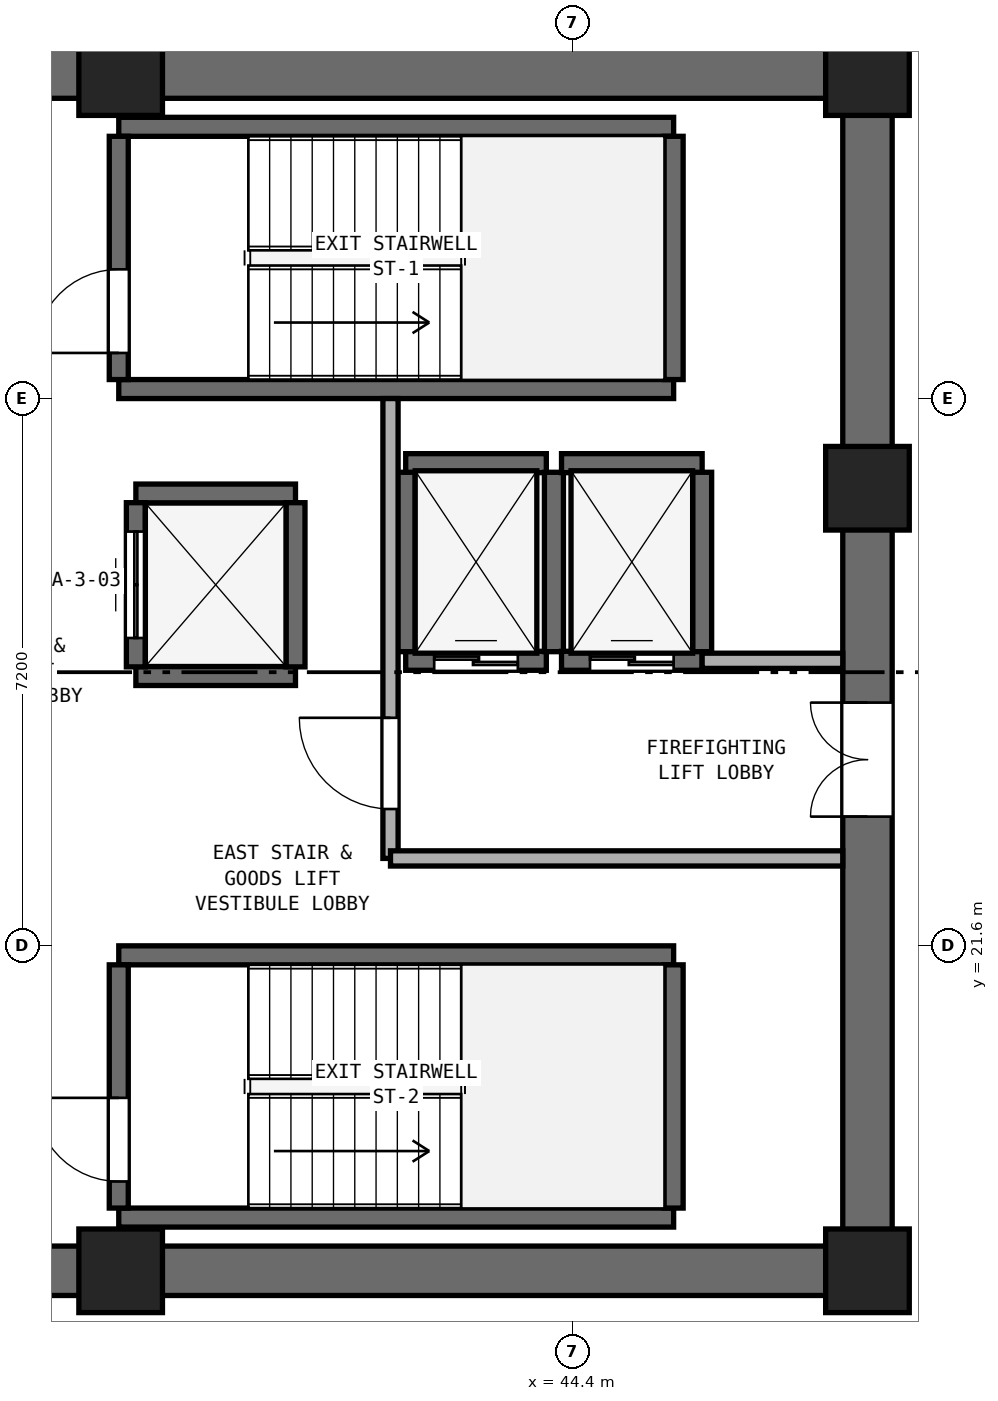
"""IFC4 building model, lengths in metres.
Left out: names, types, materials, properties, quantities, classifications, styles, units other than length and angle.
Written with IfcOpenShell. Run it as: python <this file> out.ifc"""

import sys

from ifc_helpers import new_model, si_unit, direction, frame, frame_2d, origin, origin_2d, place, context, subcontext, project, spatial, rectangle, extrude, element, fill, save


model = new_model("IFC4")
c1 = context("Model", 3, precision=1e-05, world=origin(), true_north=direction((0.0, 1.0)))
c2 = subcontext(c1, "Body", "Model", "MODEL_VIEW")
j1 = project(units=[si_unit("LENGTHUNIT", "METRE"), si_unit("PLANEANGLEUNIT", "RADIAN")], contexts=[c1])
p1 = place(None, origin())
s1 = spatial("IfcSite", under=j1, at=p1, CompositionType="ELEMENT")
p2 = place(p1, origin())
s2 = spatial("IfcBuilding", under=s1, at=p2, CompositionType="ELEMENT")
p3 = place(p2, frame((0.0, 0.0, 78.2)))
s3 = spatial("IfcBuildingStorey", under=s2, at=p3, CompositionType="ELEMENT", Elevation=78.2)
for number, where, z_axis, x_axis in (
    (1, (25.4, 17.325, 0.0), (0.0, 0.0, 1.0), (1.0, 0.0, 0.0)),
    (2, (25.4, 33.075, 0.0), (0.0, 0.0, 1.0), (1.0, 0.0, 0.0)),
):
    element("IfcWall", number, at=place(p3, frame(where, z_axis=z_axis, x_axis=x_axis)), inside=s3, PredefinedType="SHEAR", context=c2, shape_type="SweptSolid", body=[
        extrude(rectangle(XDim=23.2, YDim=0.65, at=frame_2d((11.6, 0.0))), origin(), (0.0, 0.0, 1.0), 3.525),
    ])
p4 = place(p3, frame((48.275, 17.65, 0.0), z_axis=(0.0, 0.0, 1.0), x_axis=(0.0, 1.0, 0.0)))
e3 = element("IfcWall", 3, at=p4, inside=s3, PredefinedType="SHEAR", context=c2, shape_type="SweptSolid", body=[
    extrude(rectangle(XDim=15.1, YDim=0.65, at=frame_2d((7.55, 0.0))), origin(), (0.0, 0.0, 1.0), 3.525),
])
p5 = place(p4, frame((5.65, 0.0, 0.0)))
e4 = element("IfcOpeningElement", 4, at=p5, cuts=e3, PredefinedType="OPENING", context=c2, shape_type="SweptSolid", body=[
    extrude(rectangle(XDim=1.5, YDim=2.15, at=frame_2d((0.75, 1.075))), frame((0.0, 0.335, 0.0), z_axis=(0.0, -1.0, 0.0), x_axis=(1.0, 0.0, 0.0)), (0.0, 0.0, 1.0), 0.67),
])
for number, where, z_axis, x_axis in (
    (5, (38.45, 17.325, 0.0), (0.0, 0.0, 1.0), (1.0, 0.0, 0.0)),
    (6, (48.275, 17.325, 0.0), (0.0, 0.0, 1.0), (1.0, 0.0, 0.0)),
    (7, (48.275, 27.62, 0.0), (0.0, 0.0, 1.0), (1.0, 0.0, 0.0)),
    (8, (48.275, 33.075, 0.0), (0.0, 0.0, 1.0), (1.0, 0.0, 0.0)),
    (9, (38.45, 33.075, 0.0), (0.0, 0.0, 1.0), (1.0, 0.0, 0.0)),
):
    element("IfcColumn", number, at=place(p3, frame(where, z_axis=z_axis, x_axis=x_axis)), inside=s3, PredefinedType="PILASTER", context=c2, shape_type="SweptSolid", body=[
        extrude(rectangle(XDim=1.1, YDim=1.1, at=origin_2d()), origin(), (0.0, 0.0, 1.0), 3.8),
    ])
for number, where, z_axis, x_axis in (
    (10, (38.425, 28.925, 0.0), (0.0, 0.0, 1.0), (1.0, 0.0, 0.0)),
    (11, (38.425, 32.375, 0.0), (0.0, 0.0, 1.0), (1.0, 0.0, 0.0)),
):
    element("IfcWall", number, at=place(p3, frame(where, z_axis=z_axis, x_axis=x_axis)), inside=s3, PredefinedType="SHEAR", context=c2, shape_type="SweptSolid", body=[
        extrude(rectangle(XDim=7.3, YDim=0.25, at=frame_2d((3.65, 0.0))), origin(), (0.0, 0.0, 1.0), 3.525),
    ])
p6 = place(p3, frame((38.425, 29.05, 0.0), z_axis=(0.0, 0.0, 1.0), x_axis=(0.0, 1.0, 0.0)))
e12 = element("IfcWall", 12, at=p6, inside=s3, PredefinedType="SHEAR", context=c2, shape_type="SweptSolid", body=[
    extrude(rectangle(XDim=3.2, YDim=0.25, at=frame_2d((1.6, 0.0))), origin(), (0.0, 0.0, 1.0), 3.525),
])
p7 = place(p6, frame((0.35, 0.0, 0.0)))
e13 = element("IfcOpeningElement", 13, at=p7, cuts=e12, PredefinedType="OPENING", context=c2, shape_type="SweptSolid", body=[
    extrude(rectangle(XDim=1.1, YDim=2.15, at=frame_2d((0.55, 1.075))), frame((0.0, 0.135, 0.0), z_axis=(0.0, -1.0, 0.0), x_axis=(1.0, 0.0, 0.0)), (0.0, 0.0, 1.0), 0.27),
])
p8 = place(p3, frame((45.725, 29.05, 0.0), z_axis=(0.0, 0.0, 1.0), x_axis=(0.0, 1.0, 0.0)))
e14 = element("IfcWall", 14, at=p8, inside=s3, PredefinedType="SHEAR", context=c2, shape_type="SweptSolid", body=[
    extrude(rectangle(XDim=3.2, YDim=0.25, at=frame_2d((1.6, 0.0))), origin(), (0.0, 0.0, 1.0), 3.525),
])
for number, where, z_axis, x_axis in (
    (15, (38.425, 18.025, 0.0), (0.0, 0.0, 1.0), (1.0, 0.0, 0.0)),
    (16, (38.425, 21.475, 0.0), (0.0, 0.0, 1.0), (1.0, 0.0, 0.0)),
):
    element("IfcWall", number, at=place(p3, frame(where, z_axis=z_axis, x_axis=x_axis)), inside=s3, PredefinedType="SHEAR", context=c2, shape_type="SweptSolid", body=[
        extrude(rectangle(XDim=7.3, YDim=0.25, at=frame_2d((3.65, 0.0))), origin(), (0.0, 0.0, 1.0), 3.525),
    ])
p9 = place(p3, frame((38.425, 18.15, 0.0), z_axis=(0.0, 0.0, 1.0), x_axis=(0.0, 1.0, 0.0)))
e17 = element("IfcWall", 17, at=p9, inside=s3, PredefinedType="SHEAR", context=c2, shape_type="SweptSolid", body=[
    extrude(rectangle(XDim=3.2, YDim=0.25, at=frame_2d((1.6, 0.0))), origin(), (0.0, 0.0, 1.0), 3.525),
])
p10 = place(p9, frame((0.35, 0.0, 0.0)))
e18 = element("IfcOpeningElement", 18, at=p10, cuts=e17, PredefinedType="OPENING", context=c2, shape_type="SweptSolid", body=[
    extrude(rectangle(XDim=1.1, YDim=2.15, at=frame_2d((0.55, 1.075))), frame((0.0, 0.135, 0.0), z_axis=(0.0, -1.0, 0.0), x_axis=(1.0, 0.0, 0.0)), (0.0, 0.0, 1.0), 0.27),
])
p11 = place(p3, frame((45.725, 18.15, 0.0), z_axis=(0.0, 0.0, 1.0), x_axis=(0.0, 1.0, 0.0)))
e19 = element("IfcWall", 19, at=p11, inside=s3, PredefinedType="SHEAR", context=c2, shape_type="SweptSolid", body=[
    extrude(rectangle(XDim=3.2, YDim=0.25, at=frame_2d((1.6, 0.0))), origin(), (0.0, 0.0, 1.0), 3.525),
])
p12 = place(p3, frame((42.2, 25.35, 0.0), z_axis=(0.0, 0.0, 1.0), x_axis=(1.0, 0.0, 0.0)))
e20 = element("IfcWall", 20, at=p12, inside=s3, PredefinedType="SHEAR", context=c2, shape_type="SweptSolid", body=[
    extrude(rectangle(XDim=1.85, YDim=0.25, at=frame_2d((0.925, 0.0))), origin(), (0.0, 0.0, 1.0), 3.525),
])
p13 = place(p12, frame((0.375, 0.0, 0.0)))
e21 = element("IfcOpeningElement", 21, at=p13, cuts=e20, PredefinedType="OPENING", context=c2, shape_type="SweptSolid", body=[
    extrude(rectangle(XDim=1.1, YDim=2.15, at=frame_2d((0.55, 1.075))), frame((0.0, 0.135, 0.0), z_axis=(0.0, -1.0, 0.0), x_axis=(1.0, 0.0, 0.0)), (0.0, 0.0, 1.0), 0.27),
])
p14 = place(p3, frame((42.2, 27.95, 0.0), z_axis=(0.0, 0.0, 1.0), x_axis=(1.0, 0.0, 0.0)))
e22 = element("IfcWall", 22, at=p14, inside=s3, PredefinedType="SHEAR", context=c2, shape_type="SweptSolid", body=[
    extrude(rectangle(XDim=1.85, YDim=0.25, at=frame_2d((0.925, 0.0))), origin(), (0.0, 0.0, 1.0), 3.525),
])
for number, where, z_axis, x_axis in (
    (23, (42.2, 25.47, 0.0), (0.0, 0.0, 1.0), (0.0, 1.0, 0.0)),
    (24, (44.15, 25.47, 0.0), (0.0, 0.0, 1.0), (0.0, 1.0, 0.0)),
):
    element("IfcWall", number, at=place(p3, frame(where, z_axis=z_axis, x_axis=x_axis)), inside=s3, PredefinedType="SHEAR", context=c2, shape_type="SweptSolid", body=[
        extrude(rectangle(XDim=2.36, YDim=0.25, at=frame_2d((1.18, 0.0))), origin(), (0.0, 0.0, 1.0), 3.525),
    ])
p15 = place(p3, frame((44.25, 25.35, 0.0), z_axis=(0.0, 0.0, 1.0), x_axis=(1.0, 0.0, 0.0)))
e25 = element("IfcWall", 25, at=p15, inside=s3, PredefinedType="SHEAR", context=c2, shape_type="SweptSolid", body=[
    extrude(rectangle(XDim=1.85, YDim=0.25, at=frame_2d((0.925, 0.0))), origin(), (0.0, 0.0, 1.0), 3.525),
])
p16 = place(p15, frame((0.375, 0.0, 0.0)))
e26 = element("IfcOpeningElement", 26, at=p16, cuts=e25, PredefinedType="OPENING", context=c2, shape_type="SweptSolid", body=[
    extrude(rectangle(XDim=1.1, YDim=2.15, at=frame_2d((0.55, 1.075))), frame((0.0, 0.135, 0.0), z_axis=(0.0, -1.0, 0.0), x_axis=(1.0, 0.0, 0.0)), (0.0, 0.0, 1.0), 0.27),
])
p17 = place(p3, frame((44.25, 27.95, 0.0), z_axis=(0.0, 0.0, 1.0), x_axis=(1.0, 0.0, 0.0)))
e27 = element("IfcWall", 27, at=p17, inside=s3, PredefinedType="SHEAR", context=c2, shape_type="SweptSolid", body=[
    extrude(rectangle(XDim=1.85, YDim=0.25, at=frame_2d((0.925, 0.0))), origin(), (0.0, 0.0, 1.0), 3.525),
])
p18 = place(p3, frame((46.1, 25.47, 0.0), z_axis=(0.0, 0.0, 1.0), x_axis=(0.0, 1.0, 0.0)))
e28 = element("IfcWall", 28, at=p18, inside=s3, PredefinedType="SHEAR", context=c2, shape_type="SweptSolid", body=[
    extrude(rectangle(XDim=2.36, YDim=0.25, at=frame_2d((1.18, 0.0))), origin(), (0.0, 0.0, 1.0), 3.525),
])
for number, where, z_axis, x_axis in (
    (29, (38.65, 25.15, 0.0), (0.0, 0.0, 1.0), (1.0, 0.0, 0.0)),
    (30, (38.65, 27.55, 0.0), (0.0, 0.0, 1.0), (1.0, 0.0, 0.0)),
):
    element("IfcWall", number, at=place(p3, frame(where, z_axis=z_axis, x_axis=x_axis)), inside=s3, PredefinedType="SHEAR", context=c2, shape_type="SweptSolid", body=[
        extrude(rectangle(XDim=2.1, YDim=0.25, at=frame_2d((1.05, 0.0))), origin(), (0.0, 0.0, 1.0), 3.525),
    ])
p19 = place(p3, frame((38.65, 25.27, 0.0), z_axis=(0.0, 0.0, 1.0), x_axis=(0.0, 1.0, 0.0)))
e31 = element("IfcWall", 31, at=p19, inside=s3, PredefinedType="SHEAR", context=c2, shape_type="SweptSolid", body=[
    extrude(rectangle(XDim=2.16, YDim=0.25, at=frame_2d((1.08, 0.0))), origin(), (0.0, 0.0, 1.0), 3.525),
])
p20 = place(p19, frame((0.38, 0.0, 0.0)))
e32 = element("IfcOpeningElement", 32, at=p20, cuts=e31, PredefinedType="OPENING", context=c2, shape_type="SweptSolid", body=[
    extrude(rectangle(XDim=1.4, YDim=2.2, at=frame_2d((0.7, 1.1))), frame((0.0, 0.135, 0.0), z_axis=(0.0, -1.0, 0.0), x_axis=(1.0, 0.0, 0.0)), (0.0, 0.0, 1.0), 0.27),
])
p21 = place(p3, frame((40.75, 25.27, 0.0), z_axis=(0.0, 0.0, 1.0), x_axis=(0.0, 1.0, 0.0)))
e33 = element("IfcWall", 33, at=p21, inside=s3, PredefinedType="SHEAR", context=c2, shape_type="SweptSolid", body=[
    extrude(rectangle(XDim=2.16, YDim=0.25, at=frame_2d((1.08, 0.0))), origin(), (0.0, 0.0, 1.0), 3.525),
])
p22 = place(p3, frame((42.0, 22.75, 0.0), z_axis=(0.0, 0.0, 1.0), x_axis=(0.0, 1.0, 0.0)))
e34 = element("IfcWall", 34, at=p22, inside=s3, PredefinedType="SOLIDWALL", context=c2, shape_type="SweptSolid", body=[
    extrude(rectangle(XDim=6.05, YDim=0.2, at=frame_2d((3.025, 0.0))), origin(), (0.0, 0.0, 1.0), 3.525),
])
p23 = place(p22, frame((0.65, 0.0, 0.0)))
e35 = element("IfcOpeningElement", 35, at=p23, cuts=e34, PredefinedType="OPENING", context=c2, shape_type="SweptSolid", body=[
    extrude(rectangle(XDim=1.2, YDim=2.15, at=frame_2d((0.6, 1.075))), frame((0.0, 0.11, 0.0), z_axis=(0.0, -1.0, 0.0), x_axis=(1.0, 0.0, 0.0)), (0.0, 0.0, 1.0), 0.22),
])
p24 = place(p3, frame((42.0, 22.75, 0.0), z_axis=(0.0, 0.0, 1.0), x_axis=(1.0, 0.0, 0.0)))
e36 = element("IfcWall", 36, at=p24, inside=s3, PredefinedType="SOLIDWALL", context=c2, shape_type="SweptSolid", body=[
    extrude(rectangle(XDim=5.95, YDim=0.2, at=frame_2d((2.975, 0.0))), origin(), (0.0, 0.0, 1.0), 3.525),
])
p25 = place(p3, frame((46.1, 25.35, 0.0), z_axis=(0.0, 0.0, 1.0), x_axis=(1.0, 0.0, 0.0)))
e37 = element("IfcWall", 37, at=p25, inside=s3, PredefinedType="SOLIDWALL", context=c2, shape_type="SweptSolid", body=[
    extrude(rectangle(XDim=1.85, YDim=0.2, at=frame_2d((0.925, 0.0))), origin(), (0.0, 0.0, 1.0), 3.525),
])
p26 = place(p7, origin())
e38 = element("IfcDoor", 38, at=p26, inside=s3, OperationType="SINGLE_SWING_LEFT", PredefinedType="DOOR", context=c2, shape_type="SweptSolid", body=[
    extrude(rectangle(XDim=1.1, YDim=2.15, at=frame_2d((0.55, 1.075))), frame((0.0, 0.025, 0.0), z_axis=(0.0, -1.0, 0.0), x_axis=(1.0, 0.0, 0.0)), (0.0, 0.0, 1.0), 0.05),
])
fill(e13, e38)
p27 = place(p10, origin())
e39 = element("IfcDoor", 39, at=p27, inside=s3, OperationType="SINGLE_SWING_RIGHT", PredefinedType="DOOR", context=c2, shape_type="SweptSolid", body=[
    extrude(rectangle(XDim=1.1, YDim=2.15, at=frame_2d((0.55, 1.075))), frame((0.0, 0.025, 0.0), z_axis=(0.0, -1.0, 0.0), x_axis=(1.0, 0.0, 0.0)), (0.0, 0.0, 1.0), 0.05),
])
fill(e18, e39)
p28 = place(p13, origin())
e40 = element("IfcDoor", 40, at=p28, inside=s3, OperationType="DOUBLE_DOOR_SLIDING", PredefinedType="DOOR", context=c2, shape_type="SweptSolid", body=[
    extrude(rectangle(XDim=1.1, YDim=2.15, at=frame_2d((0.55, 1.075))), frame((0.0, 0.025, 0.0), z_axis=(0.0, -1.0, 0.0), x_axis=(1.0, 0.0, 0.0)), (0.0, 0.0, 1.0), 0.05),
])
fill(e21, e40)
p29 = place(p16, origin())
e41 = element("IfcDoor", 41, at=p29, inside=s3, OperationType="DOUBLE_DOOR_SLIDING", PredefinedType="DOOR", context=c2, shape_type="SweptSolid", body=[
    extrude(rectangle(XDim=1.1, YDim=2.15, at=frame_2d((0.55, 1.075))), frame((0.0, 0.025, 0.0), z_axis=(0.0, -1.0, 0.0), x_axis=(1.0, 0.0, 0.0)), (0.0, 0.0, 1.0), 0.05),
])
fill(e26, e41)
p30 = place(p20, origin())
e42 = element("IfcDoor", 42, at=p30, inside=s3, OperationType="DOUBLE_DOOR_SLIDING", PredefinedType="DOOR", context=c2, shape_type="SweptSolid", body=[
    extrude(rectangle(XDim=1.4, YDim=2.2, at=frame_2d((0.7, 1.1))), frame((0.0, 0.025, 0.0), z_axis=(0.0, -1.0, 0.0), x_axis=(1.0, 0.0, 0.0)), (0.0, 0.0, 1.0), 0.05),
])
fill(e32, e42)
p31 = place(p23, origin())
e43 = element("IfcDoor", 43, at=p31, inside=s3, OperationType="SINGLE_SWING_RIGHT", PredefinedType="DOOR", context=c2, shape_type="SweptSolid", body=[
    extrude(rectangle(XDim=1.2, YDim=2.15, at=frame_2d((0.6, 1.075))), frame((0.0, 0.025, 0.0), z_axis=(0.0, -1.0, 0.0), x_axis=(1.0, 0.0, 0.0)), (0.0, 0.0, 1.0), 0.05),
])
fill(e35, e43)
p32 = place(p5, origin())
e44 = element("IfcDoor", 44, at=p32, inside=s3, OperationType="DOUBLE_DOOR_SINGLE_SWING", PredefinedType="DOOR", context=c2, shape_type="SweptSolid", body=[
    extrude(rectangle(XDim=1.5, YDim=2.15, at=frame_2d((0.75, 1.075))), frame((0.0, 0.025, 0.0), z_axis=(0.0, -1.0, 0.0), x_axis=(1.0, 0.0, 0.0)), (0.0, 0.0, 1.0), 0.05),
])
fill(e4, e44)
save(model, sys.argv[1])
